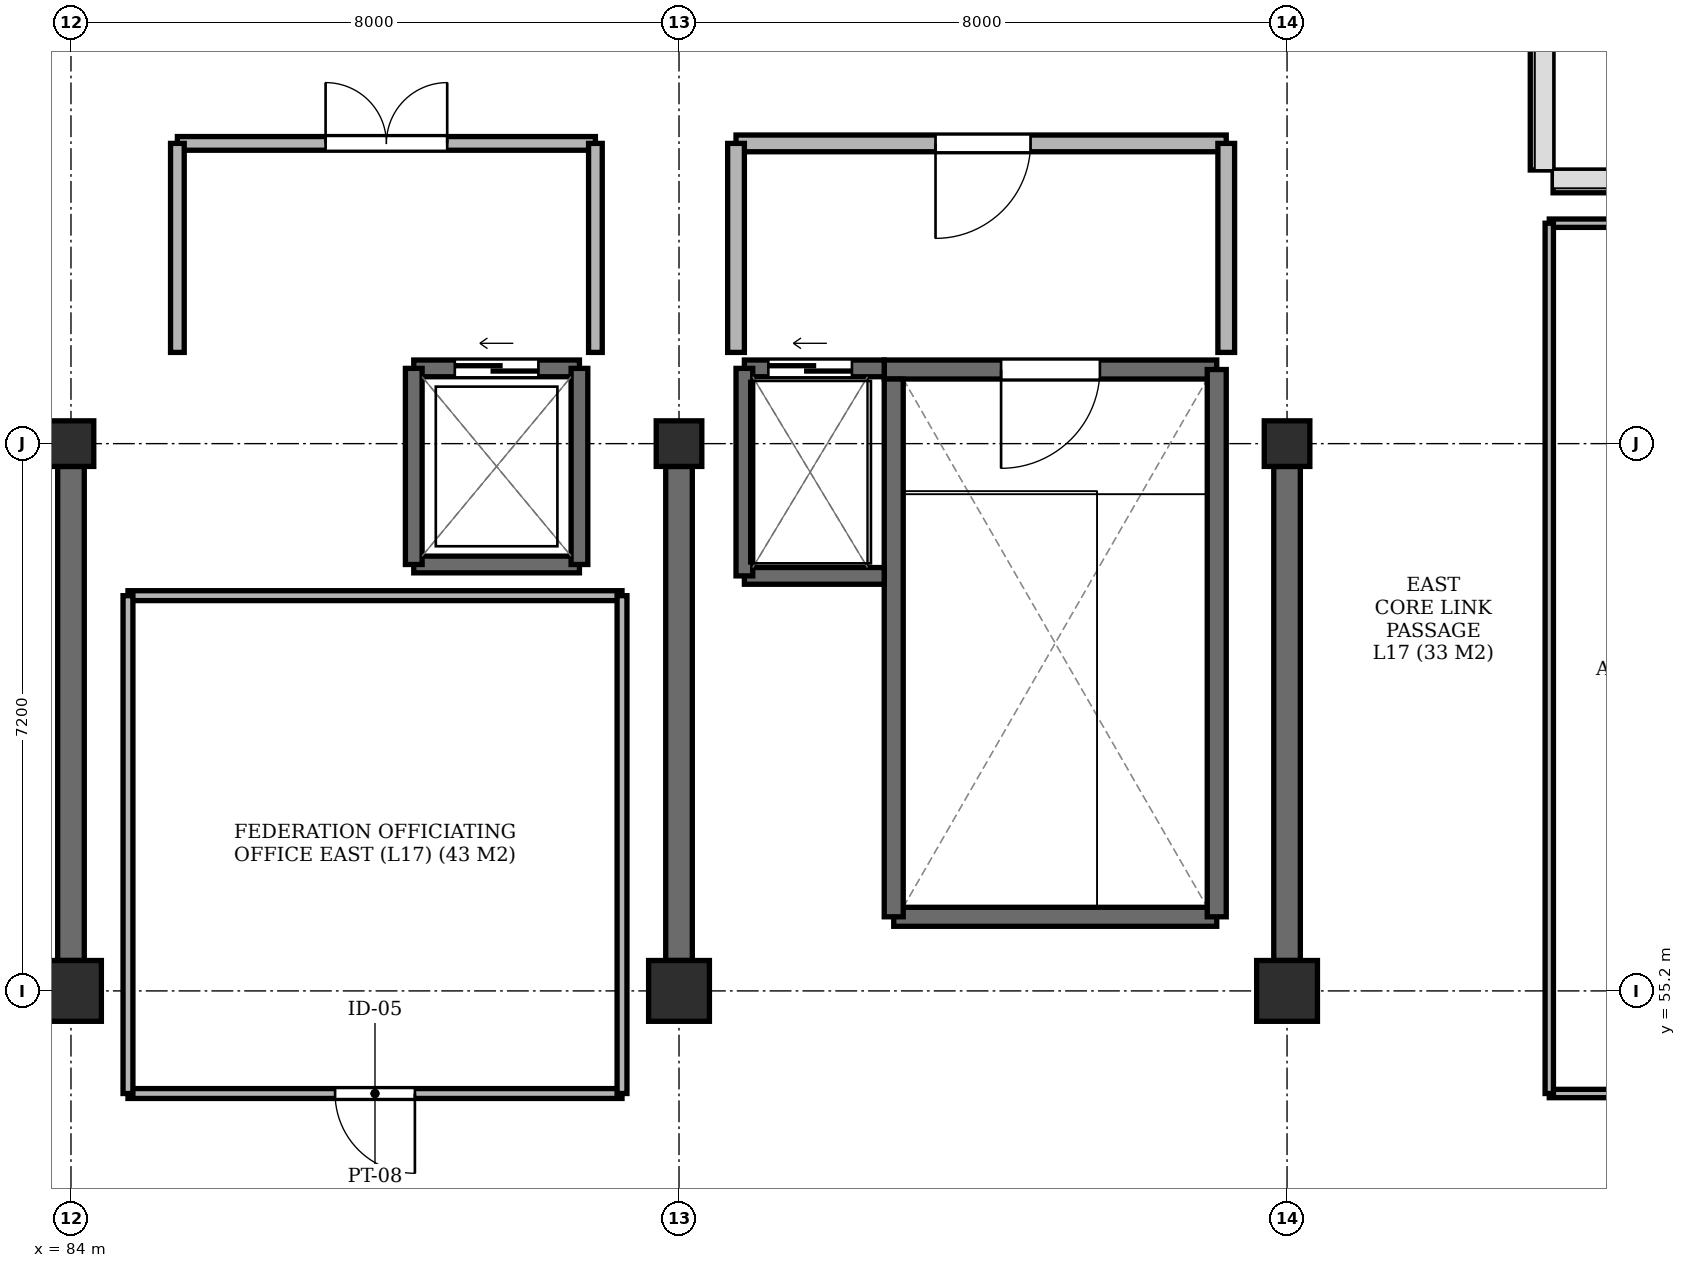
"""IFC4 building model, lengths in metres.
Left out: names, types, materials, properties, quantities, classifications, styles, units other than length and angle.
Written with IfcOpenShell. Run it as: python <this file> out.ifc"""

import sys

from ifc_helpers import new_model, si_unit, direction, frame, frame_2d, origin, origin_2d, place, context, subcontext, project, spatial, rectangle, extrude, element, fill, save


model = new_model("IFC4")
c1 = context("Model", 3, precision=1e-05, world=origin(), true_north=direction((0.0, 1.0)))
c2 = subcontext(c1, "Body", "Model", "MODEL_VIEW")
j1 = project(units=[si_unit("LENGTHUNIT", "METRE"), si_unit("PLANEANGLEUNIT", "RADIAN")], contexts=[c1])
p1 = place(None, origin())
s1 = spatial("IfcSite", under=j1, at=p1, CompositionType="ELEMENT")
p2 = place(p1, origin())
s2 = spatial("IfcBuilding", under=s1, at=p2, CompositionType="ELEMENT")
p3 = place(p2, frame((0.0, 0.0, 66.55)))
s3 = spatial("IfcBuildingStorey", under=s2, at=p3, CompositionType="ELEMENT", Elevation=66.55)
p4 = place(p3, frame((84.0, 55.2, -0.24), z_axis=(0.0, 0.0, 1.0), x_axis=(1.0, 0.0, 0.0)))
e1 = element("IfcColumn", 1, at=p4, inside=s3, PredefinedType="COLUMN", context=c2, shape_type="SweptSolid", body=[
    extrude(rectangle(XDim=0.8, YDim=0.8, at=origin_2d()), origin(), (0.0, 0.0, 1.0), 3.19),
])
p5 = place(p3, frame((84.0, 62.4, -0.24), z_axis=(0.0, 0.0, 1.0), x_axis=(1.0, 0.0, 0.0)))
e2 = element("IfcColumn", 2, at=p5, inside=s3, PredefinedType="COLUMN", context=c2, shape_type="SweptSolid", body=[
    extrude(rectangle(XDim=0.6, YDim=0.6, at=origin_2d()), origin(), (0.0, 0.0, 1.0), 3.19),
])
p6 = place(p3, frame((92.0, 55.2, -0.24), z_axis=(0.0, 0.0, 1.0), x_axis=(1.0, 0.0, 0.0)))
e3 = element("IfcColumn", 3, at=p6, inside=s3, PredefinedType="COLUMN", context=c2, shape_type="SweptSolid", body=[
    extrude(rectangle(XDim=0.8, YDim=0.8, at=origin_2d()), origin(), (0.0, 0.0, 1.0), 3.19),
])
p7 = place(p3, frame((92.0, 62.4, -0.24), z_axis=(0.0, 0.0, 1.0), x_axis=(1.0, 0.0, 0.0)))
e4 = element("IfcColumn", 4, at=p7, inside=s3, PredefinedType="COLUMN", context=c2, shape_type="SweptSolid", body=[
    extrude(rectangle(XDim=0.6, YDim=0.6, at=origin_2d()), origin(), (0.0, 0.0, 1.0), 3.19),
])
p8 = place(p3, frame((100.0, 55.2, -0.24), z_axis=(0.0, 0.0, 1.0), x_axis=(1.0, 0.0, 0.0)))
e5 = element("IfcColumn", 5, at=p8, inside=s3, PredefinedType="COLUMN", context=c2, shape_type="SweptSolid", body=[
    extrude(rectangle(XDim=0.8, YDim=0.8, at=origin_2d()), origin(), (0.0, 0.0, 1.0), 3.19),
])
p9 = place(p3, frame((100.0, 62.4, -0.24), z_axis=(0.0, 0.0, 1.0), x_axis=(1.0, 0.0, 0.0)))
e6 = element("IfcColumn", 6, at=p9, inside=s3, PredefinedType="COLUMN", context=c2, shape_type="SweptSolid", body=[
    extrude(rectangle(XDim=0.6, YDim=0.6, at=origin_2d()), origin(), (0.0, 0.0, 1.0), 3.19),
])
for number, where, z_axis, x_axis in (
    (7, (84.0, 55.6, 0.0), (0.0, 0.0, 1.0), (0.0, 1.0, 0.0)),
    (8, (92.0, 55.6, 0.0), (0.0, 0.0, 1.0), (0.0, 1.0, 0.0)),
    (9, (100.0, 55.6, 0.0), (0.0, 0.0, 1.0), (0.0, 1.0, 0.0)),
):
    element("IfcWall", number, at=place(p3, frame(where, z_axis=z_axis, x_axis=x_axis)), inside=s3, PredefinedType="SHEAR", context=c2, shape_type="SweptSolid", body=[
        extrude(rectangle(XDim=6.5, YDim=0.35, at=frame_2d((3.25, 0.0))), origin(), (0.0, 0.0, 1.0), 2.95),
    ])
p10 = place(p3, frame((108.0, 65.85, 0.0), z_axis=(0.0, 0.0, 1.0), x_axis=(-1.0, 0.0, 0.0)))
e10 = element("IfcWall", 10, at=p10, inside=s3, PredefinedType="SOLIDWALL", context=c2, shape_type="SweptSolid", body=[
    extrude(rectangle(XDim=4.5, YDim=0.3, at=frame_2d((2.25, 0.0))), origin(), (0.0, 0.0, 1.0), 2.53),
])
p11 = place(p10, frame((1.275, 0.0, 0.62)))
e11 = element("IfcOpeningElement", 11, at=p11, cuts=e10, PredefinedType="OPENING", context=c2, shape_type="SweptSolid", body=[
    extrude(rectangle(XDim=1.95, YDim=1.81, at=frame_2d((0.975, 0.905))), frame((0.0, 0.162, 0.0), z_axis=(0.0, -1.0, 0.0), x_axis=(1.0, 0.0, 0.0)), (0.0, 0.0, 1.0), 0.324),
])
p12 = place(p3, frame((103.35, 66.0, 0.0), z_axis=(0.0, 0.0, 1.0), x_axis=(0.0, 1.0, 0.0)))
e12 = element("IfcWall", 12, at=p12, inside=s3, PredefinedType="SOLIDWALL", context=c2, shape_type="SweptSolid", body=[
    extrude(rectangle(XDim=3.6, YDim=0.3, at=frame_2d((1.8, 0.0))), origin(), (0.0, 0.0, 1.0), 2.53),
])
p13 = place(p3, frame((108.0, 65.88, 3.25), z_axis=(0.0, 0.0, 1.0), x_axis=(-1.0, 0.0, 0.0)))
e13 = element("IfcWall", 13, at=p13, inside=s3, PredefinedType="PARAPET", context=c2, shape_type="SweptSolid", body=[
    extrude(rectangle(XDim=4.5, YDim=0.24, at=frame_2d((2.25, 0.0))), origin(), (0.0, 0.0, 1.0), 1.25),
])
p14 = place(p3, frame((103.38, 66.0, 3.25), z_axis=(0.0, 0.0, 1.0), x_axis=(0.0, 1.0, 0.0)))
e14 = element("IfcWall", 14, at=p14, inside=s3, PredefinedType="PARAPET", context=c2, shape_type="SweptSolid", body=[
    extrude(rectangle(XDim=3.6, YDim=0.24, at=frame_2d((1.8, 0.0))), origin(), (0.0, 0.0, 1.0), 1.25),
])
p15 = place(p3, frame((94.825, 56.175, 0.0), z_axis=(0.0, 0.0, 1.0), x_axis=(1.0, 0.0, 0.0)))
e15 = element("IfcWall", 15, at=p15, inside=s3, PredefinedType="SHEAR", context=c2, shape_type="SweptSolid", body=[
    extrude(rectangle(XDim=4.25, YDim=0.25, at=frame_2d((2.125, 0.0))), origin(), (0.0, 0.0, 1.0), 2.95),
])
p16 = place(p3, frame((99.075, 63.375, 0.0), z_axis=(0.0, 0.0, 1.0), x_axis=(-1.0, 0.0, 0.0)))
e16 = element("IfcWall", 16, at=p16, inside=s3, PredefinedType="SHEAR", context=c2, shape_type="SweptSolid", body=[
    extrude(rectangle(XDim=4.375, YDim=0.25, at=frame_2d((2.188, 0.0))), origin(), (0.0, 0.0, 1.0), 2.95),
])
p17 = place(p16, frame((1.538, 0.0, 0.0)))
e17 = element("IfcOpeningElement", 17, at=p17, cuts=e16, PredefinedType="OPENING", context=c2, shape_type="SweptSolid", body=[
    extrude(rectangle(XDim=1.3, YDim=2.2, at=frame_2d((0.65, 1.1))), frame((0.0, 0.137, 0.0), z_axis=(0.0, -1.0, 0.0), x_axis=(1.0, 0.0, 0.0)), (0.0, 0.0, 1.0), 0.274),
])
p18 = place(p3, frame((94.825, 63.25, 0.0), z_axis=(0.0, 0.0, 1.0), x_axis=(0.0, -1.0, 0.0)))
e18 = element("IfcWall", 18, at=p18, inside=s3, PredefinedType="SHEAR", context=c2, shape_type="SweptSolid", body=[
    extrude(rectangle(XDim=7.075, YDim=0.25, at=frame_2d((3.538, 0.0))), origin(), (0.0, 0.0, 1.0), 2.95),
])
p19 = place(p3, frame((99.075, 56.175, 0.0), z_axis=(0.0, 0.0, 1.0), x_axis=(0.0, 1.0, 0.0)))
e19 = element("IfcWall", 19, at=p19, inside=s3, PredefinedType="SHEAR", context=c2, shape_type="SweptSolid", body=[
    extrude(rectangle(XDim=7.2, YDim=0.25, at=frame_2d((3.6, 0.0))), origin(), (0.0, 0.0, 1.0), 2.95),
])
p20 = place(p3, frame((92.86, 60.66, 0.0), z_axis=(0.0, 0.0, 1.0), x_axis=(1.0, 0.0, 0.0)))
e20 = element("IfcWall", 20, at=p20, inside=s3, PredefinedType="SHEAR", context=c2, shape_type="SweptSolid", body=[
    extrude(rectangle(XDim=1.84, YDim=0.22, at=frame_2d((0.92, 0.0))), origin(), (0.0, 0.0, 1.0), 2.95),
])
p21 = place(p3, frame((94.7, 63.39, 0.0), z_axis=(0.0, 0.0, 1.0), x_axis=(-1.0, 0.0, 0.0)))
e21 = element("IfcWall", 21, at=p21, inside=s3, PredefinedType="SHEAR", context=c2, shape_type="SweptSolid", body=[
    extrude(rectangle(XDim=1.84, YDim=0.22, at=frame_2d((0.92, 0.0))), origin(), (0.0, 0.0, 1.0), 2.95),
])
p22 = place(p21, frame((0.425, 0.0, 0.0)))
e22 = element("IfcOpeningElement", 22, at=p22, cuts=e21, PredefinedType="OPENING", context=c2, shape_type="SweptSolid", body=[
    extrude(rectangle(XDim=1.1, YDim=2.2, at=frame_2d((0.55, 1.1))), frame((0.0, 0.122, 0.0), z_axis=(0.0, -1.0, 0.0), x_axis=(1.0, 0.0, 0.0)), (0.0, 0.0, 1.0), 0.244),
])
p23 = place(p3, frame((92.86, 63.39, 0.0), z_axis=(0.0, 0.0, 1.0), x_axis=(0.0, -1.0, 0.0)))
e23 = element("IfcWall", 23, at=p23, inside=s3, PredefinedType="SHEAR", context=c2, shape_type="SweptSolid", body=[
    extrude(rectangle(XDim=2.73, YDim=0.22, at=frame_2d((1.365, 0.0))), origin(), (0.0, 0.0, 1.0), 2.95),
])
p24 = place(p3, frame((88.51, 60.81, 0.0), z_axis=(0.0, 0.0, 1.0), x_axis=(1.0, 0.0, 0.0)))
e24 = element("IfcWall", 24, at=p24, inside=s3, PredefinedType="SHEAR", context=c2, shape_type="SweptSolid", body=[
    extrude(rectangle(XDim=2.18, YDim=0.22, at=frame_2d((1.09, 0.0))), origin(), (0.0, 0.0, 1.0), 2.95),
])
p25 = place(p3, frame((90.69, 63.39, 0.0), z_axis=(0.0, 0.0, 1.0), x_axis=(-1.0, 0.0, 0.0)))
e25 = element("IfcWall", 25, at=p25, inside=s3, PredefinedType="SHEAR", context=c2, shape_type="SweptSolid", body=[
    extrude(rectangle(XDim=2.18, YDim=0.22, at=frame_2d((1.09, 0.0))), origin(), (0.0, 0.0, 1.0), 2.95),
])
p26 = place(p25, frame((0.54, 0.0, 0.0)))
e26 = element("IfcOpeningElement", 26, at=p26, cuts=e25, PredefinedType="OPENING", context=c2, shape_type="SweptSolid", body=[
    extrude(rectangle(XDim=1.1, YDim=2.2, at=frame_2d((0.55, 1.1))), frame((0.0, 0.122, 0.0), z_axis=(0.0, -1.0, 0.0), x_axis=(1.0, 0.0, 0.0)), (0.0, 0.0, 1.0), 0.244),
])
for number, where, z_axis, x_axis in (
    (27, (88.51, 63.39, 0.0), (0.0, 0.0, 1.0), (0.0, -1.0, 0.0)),
    (28, (90.69, 60.81, 0.0), (0.0, 0.0, 1.0), (0.0, 1.0, 0.0)),
):
    element("IfcWall", number, at=place(p3, frame(where, z_axis=z_axis, x_axis=x_axis)), inside=s3, PredefinedType="SHEAR", context=c2, shape_type="SweptSolid", body=[
        extrude(rectangle(XDim=2.58, YDim=0.22, at=frame_2d((1.29, 0.0))), origin(), (0.0, 0.0, 1.0), 2.95),
    ])
p27 = place(p3, frame((92.75, 66.35, 0.0), z_axis=(0.0, 0.0, 1.0), x_axis=(1.0, 0.0, 0.0)))
e29 = element("IfcWall", 29, at=p27, inside=s3, PredefinedType="PARTITIONING", context=c2, shape_type="SweptSolid", body=[
    extrude(rectangle(XDim=6.45, YDim=0.22, at=frame_2d((3.225, 0.0))), origin(), (0.0, 0.0, 1.0), 2.53),
])
p28 = place(p27, frame((2.625, 0.0, 0.0)))
e30 = element("IfcOpeningElement", 30, at=p28, cuts=e29, PredefinedType="OPENING", context=c2, shape_type="SweptSolid", body=[
    extrude(rectangle(XDim=1.25, YDim=2.2, at=frame_2d((0.625, 1.1))), frame((0.0, 0.122, 0.0), z_axis=(0.0, -1.0, 0.0), x_axis=(1.0, 0.0, 0.0)), (0.0, 0.0, 1.0), 0.244),
])
for number, where, z_axis, x_axis in (
    (31, (92.75, 63.6, 0.0), (0.0, 0.0, 1.0), (0.0, 1.0, 0.0)),
    (32, (99.2, 63.6, 0.0), (0.0, 0.0, 1.0), (0.0, 1.0, 0.0)),
):
    element("IfcWall", number, at=place(p3, frame(where, z_axis=z_axis, x_axis=x_axis)), inside=s3, PredefinedType="PARTITIONING", context=c2, shape_type="SweptSolid", body=[
        extrude(rectangle(XDim=2.75, YDim=0.22, at=frame_2d((1.375, 0.0))), origin(), (0.0, 0.0, 1.0), 2.53),
    ])
p29 = place(p3, frame((85.4, 66.35, 0.0), z_axis=(0.0, 0.0, 1.0), x_axis=(1.0, 0.0, 0.0)))
e33 = element("IfcWall", 33, at=p29, inside=s3, PredefinedType="PARTITIONING", context=c2, shape_type="SweptSolid", body=[
    extrude(rectangle(XDim=5.5, YDim=0.18, at=frame_2d((2.75, 0.0))), origin(), (0.0, 0.0, 1.0), 2.53),
])
p30 = place(p29, frame((1.95, 0.0, 0.0)))
e34 = element("IfcOpeningElement", 34, at=p30, cuts=e33, PredefinedType="OPENING", context=c2, shape_type="SweptSolid", body=[
    extrude(rectangle(XDim=1.6, YDim=2.2, at=frame_2d((0.8, 1.1))), frame((0.0, 0.102, 0.0), z_axis=(0.0, -1.0, 0.0), x_axis=(1.0, 0.0, 0.0)), (0.0, 0.0, 1.0), 0.204),
])
for number, where, z_axis, x_axis in (
    (35, (85.4, 63.6, 0.0), (0.0, 0.0, 1.0), (0.0, 1.0, 0.0)),
    (36, (90.9, 63.6, 0.0), (0.0, 0.0, 1.0), (0.0, 1.0, 0.0)),
):
    element("IfcWall", number, at=place(p3, frame(where, z_axis=z_axis, x_axis=x_axis)), inside=s3, PredefinedType="PARTITIONING", context=c2, shape_type="SweptSolid", body=[
        extrude(rectangle(XDim=2.75, YDim=0.18, at=frame_2d((1.375, 0.0))), origin(), (0.0, 0.0, 1.0), 2.53),
    ])
p31 = place(p3, frame((103.45, 53.85, 0.0), z_axis=(0.0, 0.0, 1.0), x_axis=(1.0, 0.0, 0.0)))
e37 = element("IfcWall", 37, at=p31, inside=s3, PredefinedType="PARTITIONING", context=c2, shape_type="SweptSolid", body=[
    extrude(rectangle(XDim=3.75, YDim=0.11, at=frame_2d((1.875, 0.0))), origin(), (0.0, 0.0, 1.0), 2.53),
])
p32 = place(p31, frame((1.3, 0.0, 0.0)))
e38 = element("IfcOpeningElement", 38, at=p32, cuts=e37, PredefinedType="OPENING", context=c2, shape_type="SweptSolid", body=[
    extrude(rectangle(XDim=1.1, YDim=2.15, at=frame_2d((0.55, 1.075))), frame((0.0, 0.067, 0.0), z_axis=(0.0, -1.0, 0.0), x_axis=(1.0, 0.0, 0.0)), (0.0, 0.0, 1.0), 0.134),
])
p33 = place(p3, frame((103.45, 65.3, 0.0), z_axis=(0.0, 0.0, 1.0), x_axis=(1.0, 0.0, 0.0)))
e39 = element("IfcWall", 39, at=p33, inside=s3, PredefinedType="PARTITIONING", context=c2, shape_type="SweptSolid", body=[
    extrude(rectangle(XDim=3.75, YDim=0.11, at=frame_2d((1.875, 0.0))), origin(), (0.0, 0.0, 1.0), 2.53),
])
p34 = place(p3, frame((103.45, 53.85, 0.0), z_axis=(0.0, 0.0, 1.0), x_axis=(0.0, 1.0, 0.0)))
e40 = element("IfcWall", 40, at=p34, inside=s3, PredefinedType="PARTITIONING", context=c2, shape_type="SweptSolid", body=[
    extrude(rectangle(XDim=11.45, YDim=0.11, at=frame_2d((5.725, 0.0))), origin(), (0.0, 0.0, 1.0), 2.53),
])
p35 = place(p3, frame((84.75, 53.85, 0.0), z_axis=(0.0, 0.0, 1.0), x_axis=(1.0, 0.0, 0.0)))
e41 = element("IfcWall", 41, at=p35, inside=s3, PredefinedType="PARTITIONING", context=c2, shape_type="SweptSolid", body=[
    extrude(rectangle(XDim=6.5, YDim=0.13, at=frame_2d((3.25, 0.0))), origin(), (0.0, 0.0, 1.0), 2.53),
])
p36 = place(p35, frame((2.725, 0.0, 0.0)))
e42 = element("IfcOpeningElement", 42, at=p36, cuts=e41, PredefinedType="OPENING", context=c2, shape_type="SweptSolid", body=[
    extrude(rectangle(XDim=1.05, YDim=2.15, at=frame_2d((0.525, 1.075))), frame((0.0, 0.077, 0.0), z_axis=(0.0, -1.0, 0.0), x_axis=(1.0, 0.0, 0.0)), (0.0, 0.0, 1.0), 0.154),
])
p37 = place(p3, frame((84.75, 60.4, 0.0), z_axis=(0.0, 0.0, 1.0), x_axis=(1.0, 0.0, 0.0)))
e43 = element("IfcWall", 43, at=p37, inside=s3, PredefinedType="PARTITIONING", context=c2, shape_type="SweptSolid", body=[
    extrude(rectangle(XDim=6.5, YDim=0.13, at=frame_2d((3.25, 0.0))), origin(), (0.0, 0.0, 1.0), 2.53),
])
for number, where, z_axis, x_axis in (
    (44, (84.75, 53.85, 0.0), (0.0, 0.0, 1.0), (0.0, 1.0, 0.0)),
    (45, (91.25, 53.85, 0.0), (0.0, 0.0, 1.0), (0.0, 1.0, 0.0)),
):
    element("IfcWall", number, at=place(p3, frame(where, z_axis=z_axis, x_axis=x_axis)), inside=s3, PredefinedType="PARTITIONING", context=c2, shape_type="SweptSolid", body=[
        extrude(rectangle(XDim=6.55, YDim=0.13, at=frame_2d((3.275, 0.0))), origin(), (0.0, 0.0, 1.0), 2.53),
    ])
p38 = place(p17, origin())
e46 = element("IfcDoor", 46, at=p38, inside=s3, OperationType="SINGLE_SWING_RIGHT", PredefinedType="DOOR", context=c2, shape_type="SweptSolid", body=[
    extrude(rectangle(XDim=1.3, YDim=2.2, at=frame_2d((0.65, 1.1))), frame((0.0, 0.025, 0.0), z_axis=(0.0, -1.0, 0.0), x_axis=(1.0, 0.0, 0.0)), (0.0, 0.0, 1.0), 0.05),
])
fill(e17, e46)
p39 = place(p22, origin())
e47 = element("IfcDoor", 47, at=p39, inside=s3, OperationType="SLIDING_TO_RIGHT", PredefinedType="DOOR", context=c2, shape_type="SweptSolid", body=[
    extrude(rectangle(XDim=1.1, YDim=2.2, at=frame_2d((0.55, 1.1))), frame((0.0, 0.025, 0.0), z_axis=(0.0, -1.0, 0.0), x_axis=(1.0, 0.0, 0.0)), (0.0, 0.0, 1.0), 0.05),
])
fill(e22, e47)
p40 = place(p26, origin())
e48 = element("IfcDoor", 48, at=p40, inside=s3, OperationType="SLIDING_TO_RIGHT", PredefinedType="DOOR", context=c2, shape_type="SweptSolid", body=[
    extrude(rectangle(XDim=1.1, YDim=2.2, at=frame_2d((0.55, 1.1))), frame((0.0, 0.025, 0.0), z_axis=(0.0, -1.0, 0.0), x_axis=(1.0, 0.0, 0.0)), (0.0, 0.0, 1.0), 0.05),
])
fill(e26, e48)
p41 = place(p28, frame((1.25, 0.0, 0.0), z_axis=(0.0, 0.0, 1.0), x_axis=(-1.0, 0.0, 0.0)))
e49 = element("IfcDoor", 49, at=p41, inside=s3, OperationType="SINGLE_SWING_LEFT", PredefinedType="DOOR", context=c2, shape_type="SweptSolid", body=[
    extrude(rectangle(XDim=1.25, YDim=2.2, at=frame_2d((0.625, 1.1))), frame((0.0, 0.025, 0.0), z_axis=(0.0, -1.0, 0.0), x_axis=(1.0, 0.0, 0.0)), (0.0, 0.0, 1.0), 0.05),
])
fill(e30, e49)
p42 = place(p30, origin())
e50 = element("IfcDoor", 50, at=p42, inside=s3, OperationType="DOUBLE_DOOR_SINGLE_SWING", PredefinedType="DOOR", context=c2, shape_type="SweptSolid", body=[
    extrude(rectangle(XDim=1.6, YDim=2.2, at=frame_2d((0.8, 1.1))), frame((0.0, 0.025, 0.0), z_axis=(0.0, -1.0, 0.0), x_axis=(1.0, 0.0, 0.0)), (0.0, 0.0, 1.0), 0.05),
])
fill(e34, e50)
p43 = place(p36, frame((1.05, 0.0, 0.0), z_axis=(0.0, 0.0, 1.0), x_axis=(-1.0, 0.0, 0.0)))
e51 = element("IfcDoor", 51, at=p43, inside=s3, OperationType="SINGLE_SWING_RIGHT", PredefinedType="DOOR", context=c2, shape_type="SweptSolid", body=[
    extrude(rectangle(XDim=1.05, YDim=2.15, at=frame_2d((0.525, 1.075))), frame((0.0, 0.025, 0.0), z_axis=(0.0, -1.0, 0.0), x_axis=(1.0, 0.0, 0.0)), (0.0, 0.0, 1.0), 0.05),
])
fill(e42, e51)
save(model, sys.argv[1])
